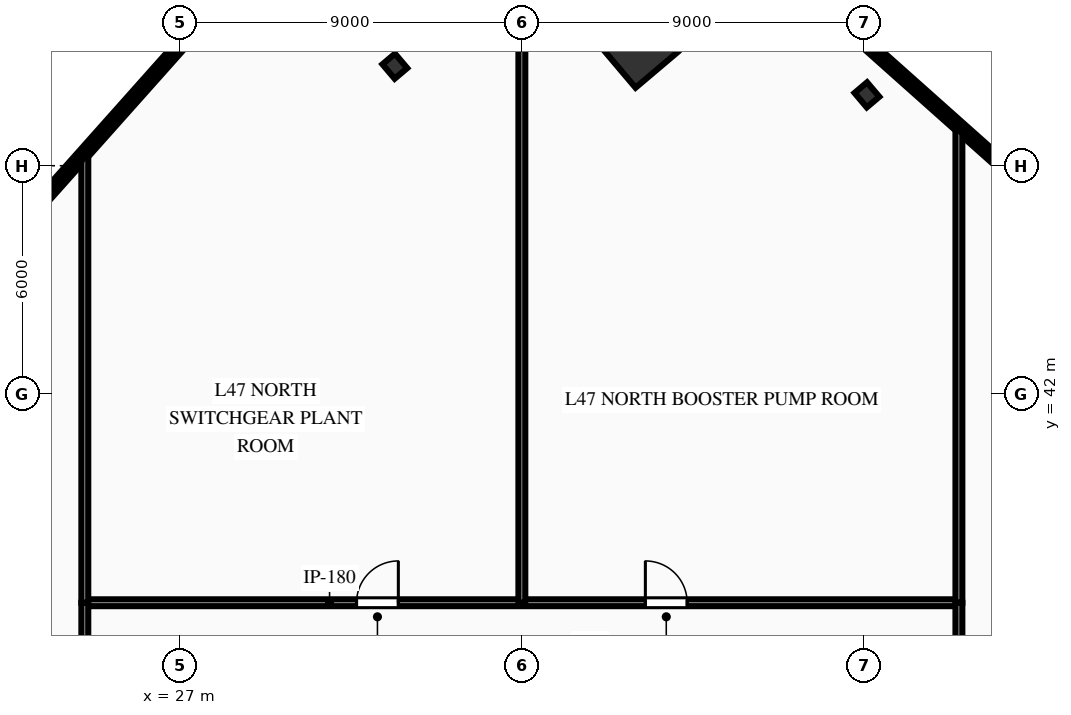
"""IFC4 building model, lengths in metres.
Left out: names, types, materials, properties, quantities, classifications, styles, units other than length and angle.
Written with IfcOpenShell. Run it as: python <this file> out.ifc"""

import sys

from ifc_helpers import new_model, si_unit, direction, frame, frame_2d, origin, origin_2d, place, context, subcontext, project, spatial, rectangle, hollow_rectangle, i_section, extrude, element, fill, save


model = new_model("IFC4")
c1 = context("Model", 3, precision=1e-05, world=origin(), true_north=direction((0.0, 1.0)))
c2 = subcontext(c1, "Body", "Model", "MODEL_VIEW")
j1 = project(units=[si_unit("LENGTHUNIT", "METRE"), si_unit("PLANEANGLEUNIT", "RADIAN")], contexts=[c1])
p1 = place(None, origin())
s1 = spatial("IfcSite", under=j1, at=p1, CompositionType="ELEMENT")
p2 = place(p1, origin())
s2 = spatial("IfcBuilding", under=s1, at=p2, CompositionType="ELEMENT")
p3 = place(p2, frame((0.0, 0.0, 189.45)))
s3 = spatial("IfcBuildingStorey", under=s2, at=p3, CompositionType="ELEMENT", Elevation=189.45)
p4 = place(p3, frame((39.077, 51.075, 0.0), z_axis=(0.0, 0.0, 1.0), x_axis=(0.763232469783, 0.646123979643, 0.0)))
e1 = element("IfcColumn", 1, at=p4, inside=s3, PredefinedType="COLUMN", context=c2, shape_type="SweptSolid", body=[
    extrude(hollow_rectangle(XDim=1.45, YDim=1.45, WallThickness=0.07, at=origin_2d()), origin(), (0.0, 0.0, 1.0), 4.5),
])
for number, where, z_axis, x_axis in (
    (2, (45.08, 49.865, 0.0), (0.0, 0.0, 1.0), (0.763, 0.646, 0.0)),
    (3, (32.657, 50.619, 0.0), (0.0, 0.0, 1.0), (0.763, 0.646, 0.0)),
):
    element("IfcColumn", number, at=place(p3, frame(where, z_axis=z_axis, x_axis=x_axis)), inside=s3, PredefinedType="COLUMN", context=c2, shape_type="SweptSolid", body=[
        extrude(i_section(OverallWidth=0.432, OverallDepth=0.498, WebThickness=0.056, FlangeThickness=0.089, at=origin_2d()), origin(), (0.0, 0.0, 1.0), 4.5),
    ])
p5 = place(p3, frame((38.009, 57.493, 0.0), z_axis=(0.0, 0.0, 1.0), x_axis=(0.746637837587, -0.665230741535, 0.0)))
e4 = element("IfcWall", 4, at=p5, inside=s3, PredefinedType="STANDARD", context=c2, shape_type="SweptSolid", body=[
    extrude(rectangle(XDim=19.637, YDim=0.28, at=frame_2d((9.819, 0.0))), origin(), (0.0, 0.0, 1.0), 1.15),
])
p6 = place(p3, frame((18.491, 41.6, 0.0), z_axis=(0.0, 0.0, 1.0), x_axis=(0.665226100778, 0.746641972329, 0.0)))
e5 = element("IfcWall", 5, at=p6, inside=s3, PredefinedType="STANDARD", context=c2, shape_type="SweptSolid", body=[
    extrude(rectangle(XDim=20.85, YDim=0.28, at=frame_2d((10.425, 0.0))), origin(), (0.0, 0.0, 1.0), 1.15),
])
p7 = place(p3, frame((24.5, 36.5, 0.0), z_axis=(0.0, 0.0, 1.0), x_axis=(1.0, 0.0, 0.0)))
e6 = element("IfcWall", 6, at=p7, inside=s3, PredefinedType="PARTITIONING", context=c2, shape_type="SweptSolid", body=[
    extrude(rectangle(XDim=23.0, YDim=0.18, at=frame_2d((11.5, 0.0))), origin(), (0.0, 0.0, 1.0), 4.09),
])
p8 = place(p7, frame((7.15, 0.0, 0.0)))
e7 = element("IfcOpeningElement", 7, at=p8, cuts=e6, PredefinedType="OPENING", context=c2, shape_type="SweptSolid", body=[
    extrude(rectangle(XDim=1.1, YDim=2.15, at=frame_2d((0.55, 1.075))), frame((0.0, 0.1, 0.0), z_axis=(0.0, -1.0, 0.0), x_axis=(1.0, 0.0, 0.0)), (0.0, 0.0, 1.0), 0.2),
])
p9 = place(p7, frame((14.75, 0.0, 0.0)))
e8 = element("IfcOpeningElement", 8, at=p9, cuts=e6, PredefinedType="OPENING", context=c2, shape_type="SweptSolid", body=[
    extrude(rectangle(XDim=1.1, YDim=2.15, at=frame_2d((0.55, 1.075))), frame((0.0, 0.1, 0.0), z_axis=(0.0, -1.0, 0.0), x_axis=(1.0, 0.0, 0.0)), (0.0, 0.0, 1.0), 0.2),
])
p10 = place(p3, frame((24.5, 15.5, 0.0), z_axis=(0.0, 0.0, 1.0), x_axis=(0.0, 1.0, 0.0)))
e9 = element("IfcWall", 9, at=p10, inside=s3, PredefinedType="PARTITIONING", context=c2, shape_type="SweptSolid", body=[
    extrude(rectangle(XDim=21.0, YDim=0.18, at=frame_2d((10.5, 0.0))), origin(), (0.0, 0.0, 1.0), 4.09),
])
p11 = place(p10, frame((7.0, 0.0, 0.0)))
e10 = element("IfcOpeningElement", 10, at=p11, cuts=e9, PredefinedType="OPENING", context=c2, shape_type="SweptSolid", body=[
    extrude(rectangle(XDim=1.4, YDim=2.2, at=frame_2d((0.7, 1.1))), frame((0.0, 0.1, 0.0), z_axis=(0.0, -1.0, 0.0), x_axis=(1.0, 0.0, 0.0)), (0.0, 0.0, 1.0), 0.2),
])
p12 = place(p3, frame((47.5, 15.5, 0.0), z_axis=(0.0, 0.0, 1.0), x_axis=(0.0, 1.0, 0.0)))
e11 = element("IfcWall", 11, at=p12, inside=s3, PredefinedType="PARTITIONING", context=c2, shape_type="SweptSolid", body=[
    extrude(rectangle(XDim=21.0, YDim=0.18, at=frame_2d((10.5, 0.0))), origin(), (0.0, 0.0, 1.0), 4.09),
])
p13 = place(p12, frame((7.0, 0.0, 0.0)))
e12 = element("IfcOpeningElement", 12, at=p13, cuts=e11, PredefinedType="OPENING", context=c2, shape_type="SweptSolid", body=[
    extrude(rectangle(XDim=1.4, YDim=2.2, at=frame_2d((0.7, 1.1))), frame((0.0, 0.1, 0.0), z_axis=(0.0, -1.0, 0.0), x_axis=(1.0, 0.0, 0.0)), (0.0, 0.0, 1.0), 0.2),
])
p14 = place(p3, frame((36.0, 36.5, 0.0), z_axis=(0.0, 0.0, 1.0), x_axis=(0.0, 1.0, 0.0)))
e13 = element("IfcWall", 13, at=p14, inside=s3, PredefinedType="PARTITIONING", context=c2, shape_type="SweptSolid", body=[
    extrude(rectangle(XDim=18.678, YDim=0.18, at=frame_2d((9.339, 0.0))), origin(), (0.0, 0.0, 1.0), 2.885),
])
p15 = place(p3, frame((24.5, 36.5, 0.0), z_axis=(0.0, 0.0, 1.0), x_axis=(0.0, 1.0, 0.0)))
e14 = element("IfcWall", 14, at=p15, inside=s3, PredefinedType="PARTITIONING", context=c2, shape_type="SweptSolid", body=[
    extrude(rectangle(XDim=11.783, YDim=0.18, at=frame_2d((5.892, 0.0))), origin(), (0.0, 0.0, 1.0), 4.09),
])
p16 = place(p3, frame((47.5, 36.5, 0.0), z_axis=(0.0, 0.0, 1.0), x_axis=(0.0, 1.0, 0.0)))
e15 = element("IfcWall", 15, at=p16, inside=s3, PredefinedType="PARTITIONING", context=c2, shape_type="SweptSolid", body=[
    extrude(rectangle(XDim=12.483, YDim=0.18, at=frame_2d((6.241, 0.0))), origin(), (0.0, 0.0, 1.0), 2.885),
])
p17 = place(p8, origin())
e16 = element("IfcDoor", 16, at=p17, inside=s3, OperationType="SINGLE_SWING_RIGHT", PredefinedType="DOOR", context=c2, shape_type="SweptSolid", body=[
    extrude(rectangle(XDim=1.1, YDim=2.15, at=frame_2d((0.55, 1.075))), frame((0.0, 0.025, 0.0), z_axis=(0.0, -1.0, 0.0), x_axis=(1.0, 0.0, 0.0)), (0.0, 0.0, 1.0), 0.05),
])
fill(e7, e16)
p18 = place(p9, origin())
e17 = element("IfcDoor", 17, at=p18, inside=s3, OperationType="SINGLE_SWING_LEFT", PredefinedType="DOOR", context=c2, shape_type="SweptSolid", body=[
    extrude(rectangle(XDim=1.1, YDim=2.15, at=frame_2d((0.55, 1.075))), frame((0.0, 0.025, 0.0), z_axis=(0.0, -1.0, 0.0), x_axis=(1.0, 0.0, 0.0)), (0.0, 0.0, 1.0), 0.05),
])
fill(e8, e17)
save(model, sys.argv[1])
